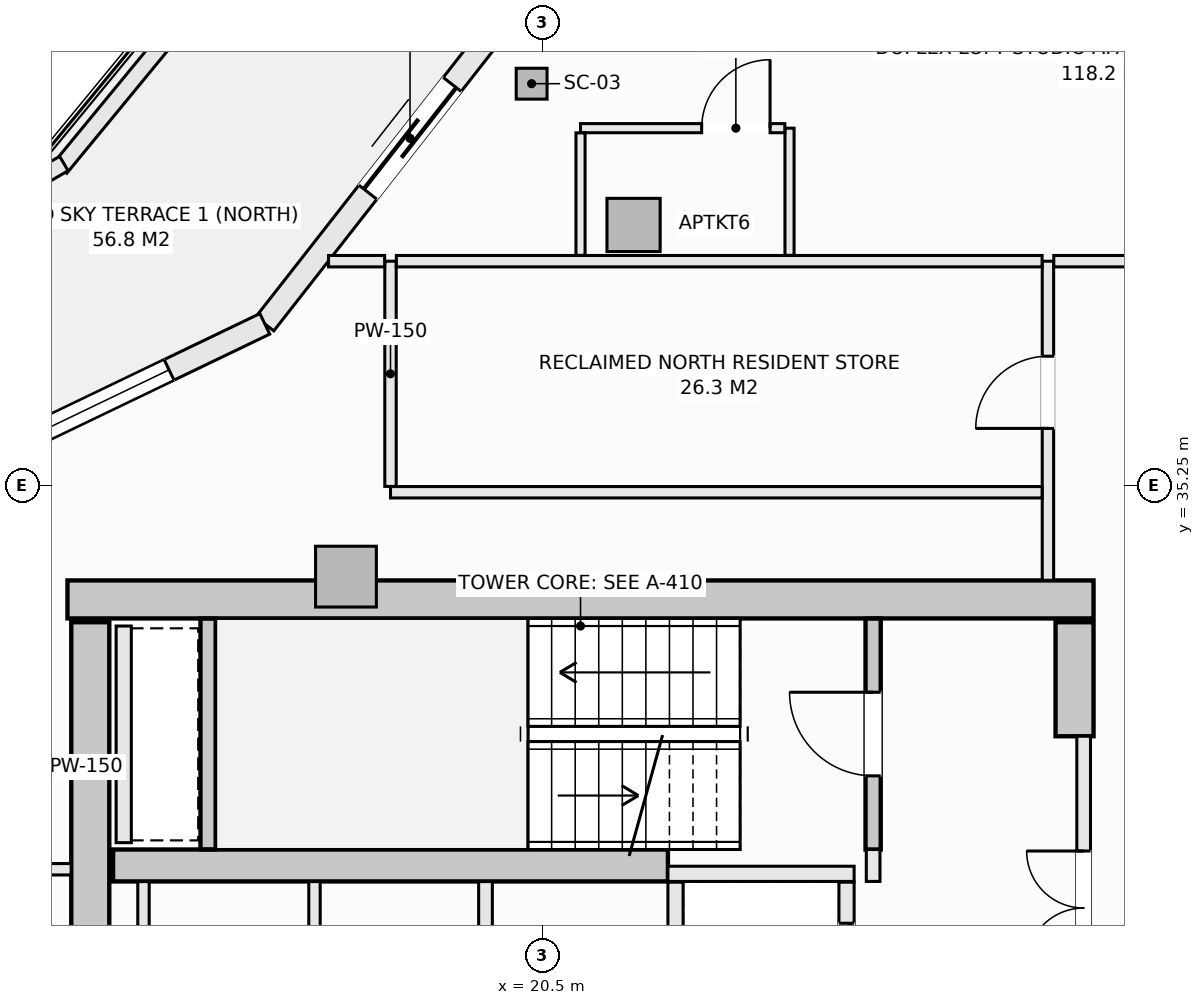
"""IFC4 building model, lengths in metres.
Left out: names, types, materials, properties, quantities, classifications, styles, units other than length and angle.
Written with IfcOpenShell. Run it as: python <this file> out.ifc"""

import sys

from ifc_helpers import new_model, si_unit, direction, frame, frame_2d, origin, origin_2d, place, context, subcontext, project, spatial, rectangle, hollow_rectangle, extrude, element, fill, save


model = new_model("IFC4")
c1 = context("Model", 3, precision=1e-05, world=origin(), true_north=direction((0.0, 1.0)))
c2 = subcontext(c1, "Body", "Model", "MODEL_VIEW")
j1 = project(units=[si_unit("LENGTHUNIT", "METRE"), si_unit("PLANEANGLEUNIT", "RADIAN")], contexts=[c1])
p1 = place(None, origin())
s1 = spatial("IfcSite", under=j1, at=p1, CompositionType="ELEMENT")
p2 = place(p1, origin())
s2 = spatial("IfcBuilding", under=s1, at=p2, CompositionType="ELEMENT")
p3 = place(p2, frame((0.0, 0.0, 272.3)))
s3 = spatial("IfcBuildingStorey", under=s2, at=p3, CompositionType="ELEMENT", Elevation=272.3)
p4 = place(p3, frame((14.25, 33.75, -0.27), z_axis=(0.0, 0.0, 1.0), x_axis=(1.0, 0.0, 0.0)))
e1 = element("IfcWall", 1, at=p4, inside=s3, PredefinedType="SHEAR", context=c2, shape_type="SweptSolid", body=[
    extrude(rectangle(XDim=13.5, YDim=0.5, at=frame_2d((6.75, 0.0))), origin(), (0.0, 0.0, 1.0), 3.25),
])
p5 = place(p3, frame((14.55, 20.55, -0.27), z_axis=(0.0, 0.0, 1.0), x_axis=(0.0, 1.0, 0.0)))
e2 = element("IfcWall", 2, at=p5, inside=s3, PredefinedType="SHEAR", context=c2, shape_type="SweptSolid", body=[
    extrude(rectangle(XDim=12.9, YDim=0.5, at=frame_2d((6.45, 0.0))), origin(), (0.0, 0.0, 1.0), 3.25),
])
p6 = place(p3, frame((27.5, 31.95, -0.27), z_axis=(0.0, 0.0, 1.0), x_axis=(0.0, 1.0, 0.0)))
e3 = element("IfcWall", 3, at=p6, inside=s3, PredefinedType="SHEAR", context=c2, shape_type="SweptSolid", body=[
    extrude(rectangle(XDim=1.5, YDim=0.5, at=frame_2d((0.75, 0.0))), origin(), (0.0, 0.0, 1.0), 3.25),
])
p7 = place(p3, frame((14.85, 30.25, -0.27), z_axis=(0.0, 0.0, 1.0), x_axis=(1.0, 0.0, 0.0)))
e4 = element("IfcWall", 4, at=p7, inside=s3, PredefinedType="SHEAR", context=c2, shape_type="SweptSolid", body=[
    extrude(rectangle(XDim=7.3, YDim=0.42, at=frame_2d((3.65, 0.0))), origin(), (0.0, 0.0, 1.0), 3.25),
])
p8 = place(p3, frame((20.357, 40.535, -0.27), z_axis=(0.0, 0.0, 1.0), x_axis=(1.0, 0.0, 0.0)))
e5 = element("IfcColumn", 5, at=p8, inside=s3, PredefinedType="COLUMN", context=c2, shape_type="SweptSolid", body=[
    extrude(hollow_rectangle(XDim=0.406, YDim=0.406, WallThickness=0.016, at=origin_2d()), origin(), (0.0, 0.0, 1.0), 3.25),
])
p9 = place(p3, frame((21.698, 38.677, -0.27), z_axis=(0.0, 0.0, 1.0), x_axis=(1.0, 0.0, 0.0)))
e6 = element("IfcColumn", 6, at=p9, inside=s3, PredefinedType="COLUMN", context=c2, shape_type="SweptSolid", body=[
    extrude(rectangle(XDim=0.7, YDim=0.7, at=origin_2d()), origin(), (0.0, 0.0, 1.0), 3.25),
])
p10 = place(p3, frame((17.914, 34.05, -0.27), z_axis=(0.0, 0.0, 1.0), x_axis=(1.0, 0.0, 0.0)))
e7 = element("IfcColumn", 7, at=p10, inside=s3, PredefinedType="PILASTER", context=c2, shape_type="SweptSolid", body=[
    extrude(rectangle(XDim=0.8, YDim=0.8, at=origin_2d()), origin(), (0.0, 0.0, 1.0), 3.25),
])
p11 = place(p3, frame((16.846, 37.375, 0.0), z_axis=(0.0, 0.0, 1.0), x_axis=(0.616413297421, 0.78742278781, 0.0)))
e8 = element("IfcWall", 8, at=p11, inside=s3, PredefinedType="SOLIDWALL", context=c2, shape_type="SweptSolid", body=[
    extrude(rectangle(XDim=4.888, YDim=0.3, at=frame_2d((2.444, 0.0))), origin(), (0.0, 0.0, 1.0), 2.555),
])
p12 = place(p11, frame((2.2, 0.0, 0.0)))
e9 = element("IfcOpeningElement", 9, at=p12, cuts=e8, PredefinedType="OPENING", context=c2, shape_type="SweptSolid", body=[
    extrude(rectangle(XDim=1.8, YDim=2.25, at=frame_2d((0.9, 1.125))), frame((0.0, 0.16, 0.0), z_axis=(0.0, -1.0, 0.0), x_axis=(1.0, 0.0, 0.0)), (0.0, 0.0, 1.0), 0.32),
])
p13 = place(p3, frame((12.344, 35.212, 0.0), z_axis=(0.0, 0.0, 1.0), x_axis=(0.901346013132, 0.433099716706, 0.0)))
e10 = element("IfcWall", 10, at=p13, inside=s3, PredefinedType="SOLIDWALL", context=c2, shape_type="SweptSolid", body=[
    extrude(rectangle(XDim=4.994, YDim=0.3, at=frame_2d((2.497, 0.0))), origin(), (0.0, 0.0, 1.0), 2.555),
])
p14 = place(p13, frame((1.397, 0.0, 0.72)))
e11 = element("IfcOpeningElement", 11, at=p14, cuts=e10, PredefinedType="OPENING", context=c2, shape_type="SweptSolid", body=[
    extrude(rectangle(XDim=2.2, YDim=1.65, at=frame_2d((1.1, 0.825))), frame((0.0, 0.16, 0.0), z_axis=(0.0, -1.0, 0.0), x_axis=(1.0, 0.0, 0.0)), (0.0, 0.0, 1.0), 0.32),
])
p15 = place(p3, frame((14.156, 39.427, 0.0), z_axis=(0.0, 0.0, 1.0), x_axis=(0.635450933862, 0.772141250455, 0.0)))
e12 = element("IfcWall", 12, at=p15, inside=s3, PredefinedType="PARAPET", context=c2, shape_type="SweptSolid", body=[
    extrude(rectangle(XDim=5.91, YDim=0.22, at=frame_2d((2.955, 0.0))), origin(), (0.0, 0.0, 1.0), 0.52),
])
p16 = place(p3, frame((9.262, 36.603, 0.0), z_axis=(0.0, 0.0, 1.0), x_axis=(0.863803671285, 0.503828559606, 0.0)))
e13 = element("IfcWall", 13, at=p16, inside=s3, PredefinedType="PARAPET", context=c2, shape_type="SweptSolid", body=[
    extrude(rectangle(XDim=5.719, YDim=0.22, at=frame_2d((2.86, 0.0))), origin(), (0.0, 0.0, 1.0), 0.52),
])
p17 = place(p3, frame((24.85, 30.46, -0.27), z_axis=(0.0, 0.0, 1.0), x_axis=(0.0, 1.0, 0.0)))
e14 = element("IfcWall", 14, at=p17, inside=s3, PredefinedType="SHEAR", context=c2, shape_type="SweptSolid", body=[
    extrude(rectangle(XDim=3.038, YDim=0.2, at=frame_2d((1.519, 0.0))), origin(), (0.0, 0.0, 1.0), 3.25),
])
p18 = place(p17, frame((0.969, 0.0, 0.27)))
e15 = element("IfcOpeningElement", 15, at=p18, cuts=e14, PredefinedType="OPENING", context=c2, shape_type="SweptSolid", body=[
    extrude(rectangle(XDim=1.1, YDim=2.15, at=frame_2d((0.55, 1.075))), frame((0.0, 0.11, 0.0), z_axis=(0.0, -1.0, 0.0), x_axis=(1.0, 0.0, 0.0)), (0.0, 0.0, 1.0), 0.22),
])
p19 = place(p3, frame((16.1, 30.462, -0.27), z_axis=(0.0, 0.0, 1.0), x_axis=(0.0, 1.0, 0.0)))
e16 = element("IfcWall", 16, at=p19, inside=s3, PredefinedType="SHEAR", context=c2, shape_type="SweptSolid", body=[
    extrude(rectangle(XDim=3.036, YDim=0.2, at=frame_2d((1.518, 0.0))), origin(), (0.0, 0.0, 1.0), 3.25),
])
p20 = place(p3, frame((22.15, 30.14, 0.0), z_axis=(0.0, 0.0, 1.0), x_axis=(1.0, 0.0, 0.0)))
e17 = element("IfcWall", 17, at=p20, inside=s3, PredefinedType="SOLIDWALL", context=c2, shape_type="SweptSolid", body=[
    extrude(rectangle(XDim=2.45, YDim=0.2, at=frame_2d((1.225, 0.0))), origin(), (0.0, 0.0, 1.0), 2.98),
])
p21 = place(p3, frame((22.25, 27.85, 0.0), z_axis=(0.0, 0.0, 1.0), x_axis=(0.0, 1.0, 0.0)))
e18 = element("IfcWall", 18, at=p21, inside=s3, PredefinedType="SOLIDWALL", context=c2, shape_type="SweptSolid", body=[
    extrude(rectangle(XDim=2.18, YDim=0.2, at=frame_2d((1.09, 0.0))), origin(), (0.0, 0.0, 1.0), 2.98),
])
p22 = place(p3, frame((24.5, 27.85, 0.0), z_axis=(0.0, 0.0, 1.0), x_axis=(0.0, 1.0, 0.0)))
e19 = element("IfcWall", 19, at=p22, inside=s3, PredefinedType="SOLIDWALL", context=c2, shape_type="SweptSolid", body=[
    extrude(rectangle(XDim=2.18, YDim=0.2, at=frame_2d((1.09, 0.0))), origin(), (0.0, 0.0, 1.0), 2.98),
])
p23 = place(p22, frame((0.54, 0.0, 0.0)))
e20 = element("IfcOpeningElement", 20, at=p23, cuts=e19, PredefinedType="OPENING", context=c2, shape_type="SweptSolid", body=[
    extrude(rectangle(XDim=1.1, YDim=2.2, at=frame_2d((0.55, 1.1))), frame((0.0, 0.11, 0.0), z_axis=(0.0, -1.0, 0.0), x_axis=(1.0, 0.0, 0.0)), (0.0, 0.0, 1.0), 0.22),
])
p24 = place(p3, frame((14.99, 30.55, 0.0), z_axis=(0.0, 0.0, 1.0), x_axis=(0.0, 1.0, 0.0)))
e21 = element("IfcWall", 21, at=p24, inside=s3, PredefinedType="SOLIDWALL", context=c2, shape_type="SweptSolid", body=[
    extrude(rectangle(XDim=2.85, YDim=0.2, at=frame_2d((1.425, 0.0))), origin(), (0.0, 0.0, 1.0), 2.98),
])
p25 = place(p3, frame((24.85, 30.04, 0.0), z_axis=(0.0, 0.0, 1.0), x_axis=(0.0, 1.0, 0.0)))
e22 = element("IfcWall", 22, at=p25, inside=s3, PredefinedType="SOLIDWALL", context=c2, shape_type="SweptSolid", body=[
    extrude(rectangle(XDim=0.42, YDim=0.18, at=frame_2d((0.21, 0.0))), origin(), (0.0, 0.0, 1.0), 2.98),
])
p26 = place(p3, frame((27.62, 22.05, 0.0), z_axis=(0.0, 0.0, 1.0), x_axis=(0.0, 1.0, 0.0)))
e23 = element("IfcWall", 23, at=p26, inside=s3, PredefinedType="SOLIDWALL", context=c2, shape_type="SweptSolid", body=[
    extrude(rectangle(XDim=9.9, YDim=0.18, at=frame_2d((4.95, 0.0))), origin(), (0.0, 0.0, 1.0), 2.98),
])
p27 = place(p26, frame((4.475, 0.0, 0.0)))
e24 = element("IfcOpeningElement", 24, at=p27, cuts=e23, PredefinedType="OPENING", context=c2, shape_type="SweptSolid", body=[
    extrude(rectangle(XDim=0.95, YDim=2.1, at=frame_2d((0.475, 1.05))), frame((0.0, 0.1, 0.0), z_axis=(0.0, -1.0, 0.0), x_axis=(1.0, 0.0, 0.0)), (0.0, 0.0, 1.0), 0.2),
])
p28 = place(p26, frame((6.89, 0.0, 0.0)))
e25 = element("IfcOpeningElement", 25, at=p28, cuts=e23, PredefinedType="OPENING", context=c2, shape_type="SweptSolid", body=[
    extrude(rectangle(XDim=1.5, YDim=2.2, at=frame_2d((0.75, 1.1))), frame((0.0, 0.1, 0.0), z_axis=(0.0, -1.0, 0.0), x_axis=(1.0, 0.0, 0.0)), (0.0, 0.0, 1.0), 0.2),
])
p29 = place(p26, frame((1.51, 0.0, 0.0)))
e26 = element("IfcOpeningElement", 26, at=p29, cuts=e23, PredefinedType="OPENING", context=c2, shape_type="SweptSolid", body=[
    extrude(rectangle(XDim=1.5, YDim=2.2, at=frame_2d((0.75, 1.1))), frame((0.0, 0.1, 0.0), z_axis=(0.0, -1.0, 0.0), x_axis=(1.0, 0.0, 0.0)), (0.0, 0.0, 1.0), 0.2),
])
p30 = place(p3, frame((15.25, 27.932, 0.0), z_axis=(0.0, 0.0, 1.0), x_axis=(0.0, 1.0, 0.0)))
e27 = element("IfcWall", 27, at=p30, inside=s3, PredefinedType="PARTITIONING", context=c2, shape_type="SweptSolid", body=[
    extrude(rectangle(XDim=2.106, YDim=0.15, at=frame_2d((1.053, 0.0))), origin(), (0.0, 0.0, 1.0), 2.98),
])
p31 = place(p3, frame((19.75, 27.932, 0.0), z_axis=(0.0, 0.0, 1.0), x_axis=(0.0, 1.0, 0.0)))
e28 = element("IfcWall", 28, at=p31, inside=s3, PredefinedType="SOLIDWALL", context=c2, shape_type="SweptSolid", body=[
    extrude(rectangle(XDim=2.106, YDim=0.18, at=frame_2d((1.053, 0.0))), origin(), (0.0, 0.0, 1.0), 2.98),
])
p32 = place(p3, frame((12.0, 30.2, 0.0), z_axis=(0.0, 0.0, 1.0), x_axis=(1.0, 0.0, 0.0)))
e29 = element("IfcWall", 29, at=p32, inside=s3, PredefinedType="PARTITIONING", context=c2, shape_type="SweptSolid", body=[
    extrude(rectangle(XDim=2.298, YDim=0.15, at=frame_2d((1.149, 0.0))), origin(), (0.0, 0.0, 1.0), 2.98),
])
p33 = place(p32, frame((0.699, 0.0, 0.0)))
e30 = element("IfcOpeningElement", 30, at=p33, cuts=e29, PredefinedType="OPENING", context=c2, shape_type="SweptSolid", body=[
    extrude(rectangle(XDim=0.9, YDim=2.1, at=frame_2d((0.45, 1.05))), frame((0.0, 0.085, 0.0), z_axis=(0.0, -1.0, 0.0), x_axis=(1.0, 0.0, 0.0)), (0.0, 0.0, 1.0), 0.17),
])
p34 = place(p3, frame((17.5, 27.932, 0.0), z_axis=(0.0, 0.0, 1.0), x_axis=(0.0, 1.0, 0.0)))
e31 = element("IfcWall", 31, at=p34, inside=s3, PredefinedType="PARTITIONING", context=c2, shape_type="SweptSolid", body=[
    extrude(rectangle(XDim=2.106, YDim=0.15, at=frame_2d((1.053, 0.0))), origin(), (0.0, 0.0, 1.0), 2.98),
])
p35 = place(p3, frame((27.15, 34.002, 0.0), z_axis=(0.0, 0.0, 1.0), x_axis=(0.0, 1.0, 0.0)))
e32 = element("IfcWall", 32, at=p35, inside=s3, PredefinedType="PARTITIONING", context=c2, shape_type="SweptSolid", body=[
    extrude(rectangle(XDim=4.198, YDim=0.15, at=frame_2d((2.099, 0.0))), origin(), (0.0, 0.0, 1.0), 2.98),
])
p36 = place(p35, frame((1.998, 0.0, 0.0)))
e33 = element("IfcOpeningElement", 33, at=p36, cuts=e32, PredefinedType="OPENING", context=c2, shape_type="SweptSolid", body=[
    extrude(rectangle(XDim=0.95, YDim=2.1, at=frame_2d((0.475, 1.05))), frame((0.0, 0.085, 0.0), z_axis=(0.0, -1.0, 0.0), x_axis=(1.0, 0.0, 0.0)), (0.0, 0.0, 1.0), 0.17),
])
p37 = place(p3, frame((18.5, 35.16, 0.0), z_axis=(0.0, 0.0, 1.0), x_axis=(1.0, 0.0, 0.0)))
e34 = element("IfcWall", 34, at=p37, inside=s3, PredefinedType="PARTITIONING", context=c2, shape_type="SweptSolid", body=[
    extrude(rectangle(XDim=8.573, YDim=0.15, at=frame_2d((4.287, 0.0))), origin(), (0.0, 0.0, 1.0), 2.98),
])
p38 = place(p3, frame((18.5, 35.237, 0.0), z_axis=(0.0, 0.0, 1.0), x_axis=(0.0, 1.0, 0.0)))
e35 = element("IfcWall", 35, at=p38, inside=s3, PredefinedType="PARTITIONING", context=c2, shape_type="SweptSolid", body=[
    extrude(rectangle(XDim=2.963, YDim=0.15, at=frame_2d((1.481, 0.0))), origin(), (0.0, 0.0, 1.0), 2.98),
])
p39 = place(p3, frame((17.685, 38.2, 0.0), z_axis=(0.0, 0.0, 1.0), x_axis=(1.0, 0.0, 0.0)))
e36 = element("IfcWall", 36, at=p39, inside=s3, PredefinedType="PARTITIONING", context=c2, shape_type="SweptSolid", body=[
    extrude(rectangle(XDim=0.738, YDim=0.15, at=frame_2d((0.369, 0.0))), origin(), (0.0, 0.0, 1.0), 2.98),
])
p40 = place(p3, frame((18.577, 38.2, 0.0), z_axis=(0.0, 0.0, 1.0), x_axis=(1.0, 0.0, 0.0)))
e37 = element("IfcWall", 37, at=p40, inside=s3, PredefinedType="PARTITIONING", context=c2, shape_type="SweptSolid", body=[
    extrude(rectangle(XDim=8.496, YDim=0.15, at=frame_2d((4.248, 0.0))), origin(), (0.0, 0.0, 1.0), 2.98),
])
p41 = place(p3, frame((27.227, 38.2, 0.0), z_axis=(0.0, 0.0, 1.0), x_axis=(1.0, 0.0, 0.0)))
e38 = element("IfcWall", 38, at=p41, inside=s3, PredefinedType="PARTITIONING", context=c2, shape_type="SweptSolid", body=[
    extrude(rectangle(XDim=2.711, YDim=0.15, at=frame_2d((1.355, 0.0))), origin(), (0.0, 0.0, 1.0), 2.98),
])
p42 = place(p3, frame((23.75, 38.277, 0.0), z_axis=(0.0, 0.0, 1.0), x_axis=(0.0, 1.0, 0.0)))
e39 = element("IfcWall", 39, at=p42, inside=s3, PredefinedType="PARTITIONING", context=c2, shape_type="SweptSolid", body=[
    extrude(rectangle(XDim=1.673, YDim=0.12, at=frame_2d((0.836, 0.0))), origin(), (0.0, 0.0, 1.0), 2.98),
])
p43 = place(p3, frame((21.0, 39.95, 0.0), z_axis=(0.0, 0.0, 1.0), x_axis=(1.0, 0.0, 0.0)))
e40 = element("IfcWall", 40, at=p43, inside=s3, PredefinedType="PARTITIONING", context=c2, shape_type="SweptSolid", body=[
    extrude(rectangle(XDim=2.688, YDim=0.12, at=frame_2d((1.344, 0.0))), origin(), (0.0, 0.0, 1.0), 2.98),
])
p44 = place(p43, frame((1.594, 0.0, 0.0)))
e41 = element("IfcOpeningElement", 41, at=p44, cuts=e40, PredefinedType="OPENING", context=c2, shape_type="SweptSolid", body=[
    extrude(rectangle(XDim=0.9, YDim=2.1, at=frame_2d((0.45, 1.05))), frame((0.0, 0.07, 0.0), z_axis=(0.0, -1.0, 0.0), x_axis=(1.0, 0.0, 0.0)), (0.0, 0.0, 1.0), 0.14),
])
p45 = place(p3, frame((21.0, 38.277, 0.0), z_axis=(0.0, 0.0, 1.0), x_axis=(0.0, 1.0, 0.0)))
e42 = element("IfcWall", 42, at=p45, inside=s3, PredefinedType="PARTITIONING", context=c2, shape_type="SweptSolid", body=[
    extrude(rectangle(XDim=1.611, YDim=0.12, at=frame_2d((0.805, 0.0))), origin(), (0.0, 0.0, 1.0), 2.428),
])
p46 = place(p12, origin())
e43 = element("IfcDoor", 43, at=p46, inside=s3, OperationType="SLIDING_TO_LEFT", PredefinedType="DOOR", context=c2, shape_type="SweptSolid", body=[
    extrude(rectangle(XDim=1.8, YDim=2.25, at=frame_2d((0.9, 1.125))), frame((0.0, 0.025, 0.0), z_axis=(0.0, -1.0, 0.0), x_axis=(1.0, 0.0, 0.0)), (0.0, 0.0, 1.0), 0.05),
])
fill(e9, e43)
p47 = place(p14, origin())
e44 = element("IfcWindow", 44, at=p47, inside=s3, PartitioningType="SINGLE_PANEL", PredefinedType="WINDOW", context=c2, shape_type="SweptSolid", body=[
    extrude(rectangle(XDim=2.2, YDim=1.65, at=frame_2d((1.1, 0.825))), frame((0.0, 0.03, 0.0), z_axis=(0.0, -1.0, 0.0), x_axis=(1.0, 0.0, 0.0)), (0.0, 0.0, 1.0), 0.06),
])
fill(e11, e44)
p48 = place(p18, origin())
e45 = element("IfcDoor", 45, at=p48, inside=s3, OperationType="SINGLE_SWING_RIGHT", PredefinedType="DOOR", context=c2, shape_type="SweptSolid", body=[
    extrude(rectangle(XDim=1.1, YDim=2.15, at=frame_2d((0.55, 1.075))), frame((0.0, 0.025, 0.0), z_axis=(0.0, -1.0, 0.0), x_axis=(1.0, 0.0, 0.0)), (0.0, 0.0, 1.0), 0.05),
])
fill(e15, e45)
p49 = place(p23, origin())
e46 = element("IfcDoor", 46, at=p49, inside=s3, OperationType="SLIDING_TO_LEFT", PredefinedType="DOOR", context=c2, shape_type="SweptSolid", body=[
    extrude(rectangle(XDim=1.1, YDim=2.2, at=frame_2d((0.55, 1.1))), frame((0.0, 0.025, 0.0), z_axis=(0.0, -1.0, 0.0), x_axis=(1.0, 0.0, 0.0)), (0.0, 0.0, 1.0), 0.05),
])
fill(e20, e46)
p50 = place(p28, origin())
e47 = element("IfcDoor", 47, at=p50, inside=s3, OperationType="DOUBLE_DOOR_SINGLE_SWING", PredefinedType="DOOR", context=c2, shape_type="SweptSolid", body=[
    extrude(rectangle(XDim=1.5, YDim=2.2, at=frame_2d((0.75, 1.1))), frame((0.0, 0.025, 0.0), z_axis=(0.0, -1.0, 0.0), x_axis=(1.0, 0.0, 0.0)), (0.0, 0.0, 1.0), 0.05),
])
fill(e25, e47)
p51 = place(p36, origin())
e48 = element("IfcDoor", 48, at=p51, inside=s3, OperationType="SINGLE_SWING_LEFT", PredefinedType="DOOR", context=c2, shape_type="SweptSolid", body=[
    extrude(rectangle(XDim=0.95, YDim=2.1, at=frame_2d((0.475, 1.05))), frame((0.0, 0.025, 0.0), z_axis=(0.0, -1.0, 0.0), x_axis=(1.0, 0.0, 0.0)), (0.0, 0.0, 1.0), 0.05),
])
fill(e33, e48)
p52 = place(p44, origin())
e49 = element("IfcDoor", 49, at=p52, inside=s3, OperationType="SINGLE_SWING_RIGHT", PredefinedType="DOOR", context=c2, shape_type="SweptSolid", body=[
    extrude(rectangle(XDim=0.9, YDim=2.1, at=frame_2d((0.45, 1.05))), frame((0.0, 0.025, 0.0), z_axis=(0.0, -1.0, 0.0), x_axis=(1.0, 0.0, 0.0)), (0.0, 0.0, 1.0), 0.05),
])
fill(e41, e49)
save(model, sys.argv[1])
